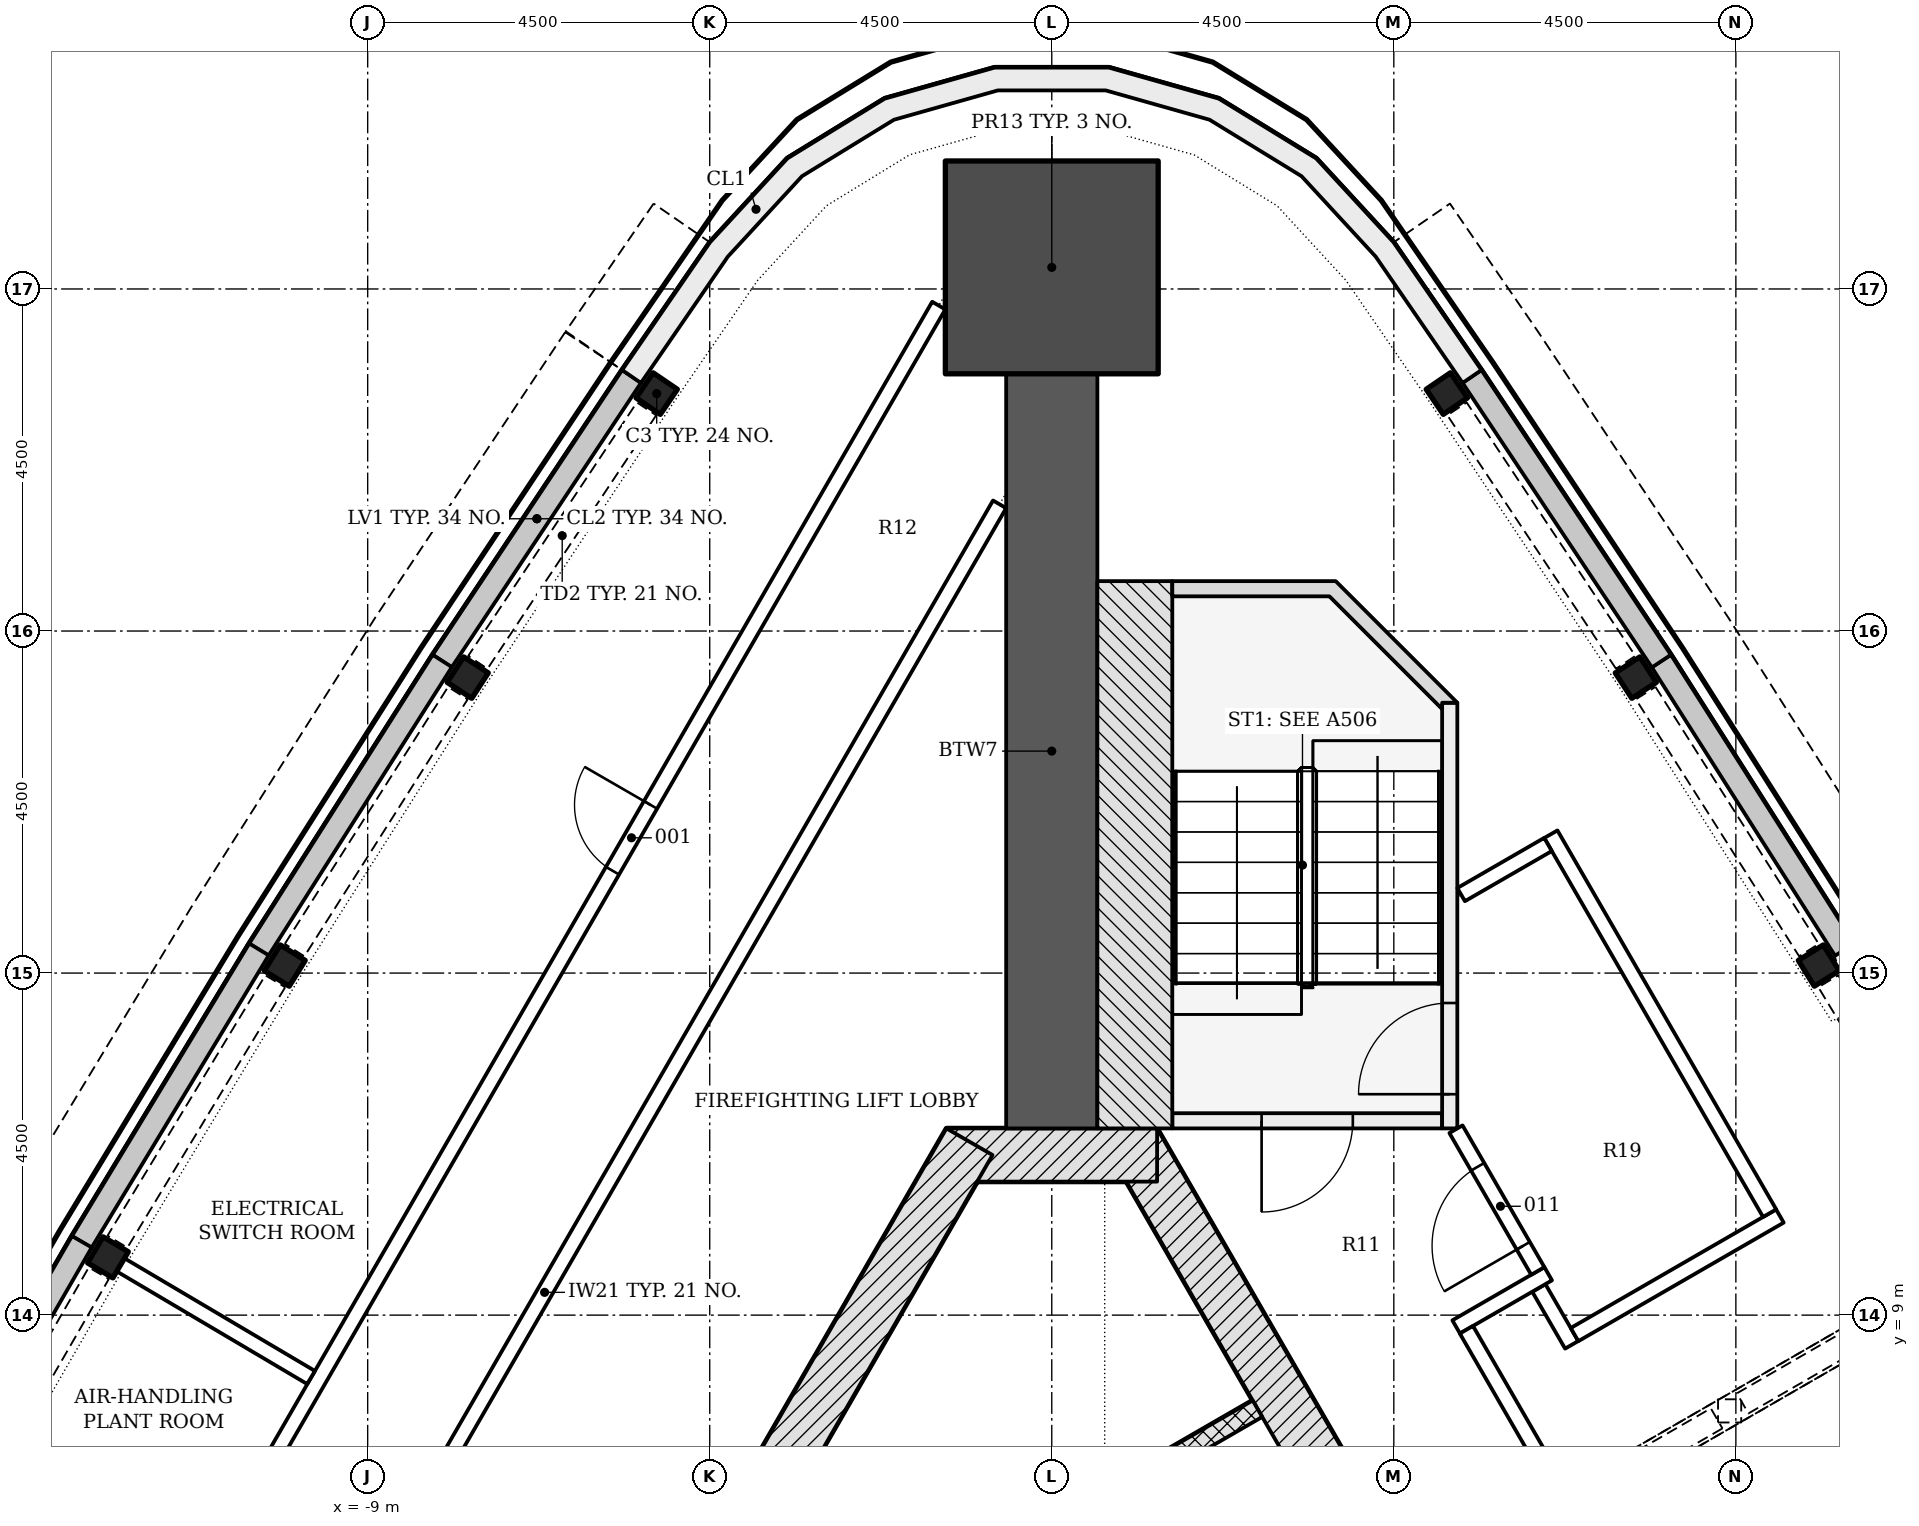
"""IFC4 building model, lengths in metres.
Left out: names, types, materials, properties, quantities, classifications, styles, units other than length and angle.
Written with IfcOpenShell. Run it as: python <this file> out.ifc"""

import sys

from ifc_helpers import new_model, si_unit, direction, frame, frame_2d, origin, origin_2d, place, context, subcontext, project, spatial, polyline, rectangle, i_section, outline, extrude, element, fill, save


model = new_model("IFC4")
c1 = context("Model", 3, precision=1e-05, world=origin(), true_north=direction((0.0, 1.0)))
c2 = subcontext(c1, "Body", "Model", "MODEL_VIEW")
j1 = project(units=[si_unit("LENGTHUNIT", "METRE"), si_unit("PLANEANGLEUNIT", "RADIAN")], contexts=[c1])
p1 = place(None, origin())
s1 = spatial("IfcSite", under=j1, at=p1, CompositionType="ELEMENT")
p2 = place(p1, origin())
s2 = spatial("IfcBuilding", under=s1, at=p2, CompositionType="ELEMENT")
p3 = place(p2, frame((0.0, 0.0, 168.9)))
s3 = spatial("IfcBuildingStorey", under=s2, at=p3, CompositionType="ELEMENT", Elevation=168.9)
p4 = place(p3, frame((10.311, -4.703, -0.3), z_axis=(0.0, 0.0, 1.0), x_axis=(-0.500001446645, 0.866024568562, 0.0)))
e1 = element("IfcWall", 1, at=p4, inside=s3, PredefinedType="SHEAR", context=c2, shape_type="SweptSolid", body=[
    extrude(rectangle(XDim=18.458, YDim=0.7, at=frame_2d((9.229, 0.0))), origin(), (0.0, 0.0, 1.0), 5.5),
])
p5 = place(p3, frame((1.386, 11.106, -0.3), z_axis=(0.0, 0.0, 1.0), x_axis=(-1.0, 0.0, 0.0)))
e2 = element("IfcWall", 2, at=p5, inside=s3, PredefinedType="SHEAR", context=c2, shape_type="SweptSolid", body=[
    extrude(rectangle(XDim=2.771, YDim=0.7, at=frame_2d((1.386, 0.0))), origin(), (0.0, 0.0, 1.0), 5.5),
])
p6 = place(p3, frame((-1.083, 11.281, -0.3), z_axis=(0.0, 0.0, 1.0), x_axis=(-0.500001446645, -0.866024568562, 0.0)))
e3 = element("IfcWall", 3, at=p6, inside=s3, PredefinedType="SHEAR", context=c2, shape_type="SweptSolid", body=[
    extrude(rectangle(XDim=18.458, YDim=0.7, at=frame_2d((9.229, 0.0))), origin(), (0.0, 0.0, 1.0), 5.5),
])
p7 = place(p6, frame((8.979, 0.0, 0.3)))
e4 = element("IfcOpeningElement", 4, at=p7, cuts=e3, PredefinedType="OPENING", context=c2, shape_type="SweptSolid", body=[
    extrude(rectangle(XDim=1.2, YDim=2.1, at=frame_2d((0.6, 1.05))), frame((0.0, 0.36, 0.0), z_axis=(0.0, -1.0, 0.0), x_axis=(1.0, 0.0, 0.0)), (0.0, 0.0, 1.0), 0.72),
])
p8 = place(p6, frame((11.029, 0.0, 0.3)))
e5 = element("IfcOpeningElement", 5, at=p8, cuts=e3, PredefinedType="OPENING", context=c2, shape_type="SweptSolid", body=[
    extrude(rectangle(XDim=1.2, YDim=2.1, at=frame_2d((0.6, 1.05))), frame((0.0, 0.36, 0.0), z_axis=(0.0, -1.0, 0.0), x_axis=(1.0, 0.0, 0.0)), (0.0, 0.0, 1.0), 0.72),
])
p9 = place(p3, frame((0.0, 11.456, -0.3), z_axis=(0.0, 0.0, 1.0), x_axis=(0.0, 1.0, 0.0)))
e6 = element("IfcWall", 6, at=p9, inside=s3, PredefinedType="SHEAR", context=c2, shape_type="SweptSolid", body=[
    extrude(rectangle(XDim=9.928, YDim=1.2, at=frame_2d((4.964, 0.0))), origin(), (0.0, 0.0, 1.0), 5.5),
])
p10 = place(p3, frame((0.0, 22.784, -0.3), z_axis=(0.0, 0.0, 1.0), x_axis=(0.0, 1.0, 0.0)))
e7 = element("IfcColumn", 7, at=p10, inside=s3, PredefinedType="COLUMN", context=c2, shape_type="SweptSolid", body=[
    extrude(rectangle(XDim=2.8, YDim=2.8, at=origin_2d()), origin(), (0.0, 0.0, 1.0), 5.5),
])
for number, where, z_axis, x_axis in (
    (8, (-5.198, 21.124, -0.3), (0.0, 0.0, 1.0), (-0.563, -0.827, 0.0)),
    (9, (-7.684, 17.387, -0.3), (0.0, 0.0, 1.0), (-0.545, -0.838, 0.0)),
    (10, (-10.091, 13.599, -0.3), (0.0, 0.0, 1.0), (-0.527, -0.85, 0.0)),
    (11, (-12.417, 9.76, -0.3), (0.0, 0.0, 1.0), (-0.509, -0.861, 0.0)),
    (12, (10.091, 13.599, -0.3), (0.0, 0.0, 1.0), (-0.527, 0.85, 0.0)),
    (13, (7.684, 17.387, -0.3), (0.0, 0.0, 1.0), (-0.545, 0.838, 0.0)),
    (14, (5.198, 21.124, -0.3), (0.0, 0.0, 1.0), (-0.563, 0.827, 0.0)),
):
    element("IfcColumn", number, at=place(p3, frame(where, z_axis=z_axis, x_axis=x_axis)), inside=s3, PredefinedType="COLUMN", context=c2, shape_type="SweptSolid", body=[
        extrude(i_section(OverallWidth=0.399, OverallDepth=0.386, WebThickness=0.021, FlangeThickness=0.033, FilletRadius=0.015, at=origin_2d()), origin(), (0.0, 0.0, 1.0), 5.5),
    ])
p11 = place(p3, origin())
e15 = element("IfcWall", 15, at=p11, inside=s3, PredefinedType="NOTDEFINED", context=c2, shape_type="SweptSolid", body=[
    extrude(outline(polyline([(-5.652, 21.433), (-8.145, 17.687), (-7.896, 17.521), (-5.403, 21.267), (-5.652, 21.433)])), origin(), (0.0, 0.0, 1.0), 1.2),
])
p12 = place(p3, origin())
e16 = element("IfcWall", 16, at=p12, inside=s3, PredefinedType="NOTDEFINED", context=c2, shape_type="SweptSolid", body=[
    extrude(outline(polyline([(-8.145, 17.687), (-10.558, 13.889), (-10.305, 13.728), (-7.892, 17.526), (-8.145, 17.687)])), origin(), (0.0, 0.0, 1.0), 1.2),
])
p13 = place(p3, origin())
e17 = element("IfcWall", 17, at=p13, inside=s3, PredefinedType="NOTDEFINED", context=c2, shape_type="SweptSolid", body=[
    extrude(outline(polyline([(-10.558, 13.889), (-12.89, 10.04), (-12.634, 9.885), (-10.302, 13.733), (-10.558, 13.889)])), origin(), (0.0, 0.0, 1.0), 1.2),
])
p14 = place(p3, origin())
e18 = element("IfcWall", 18, at=p14, inside=s3, PredefinedType="NOTDEFINED", context=c2, shape_type="SweptSolid", body=[
    extrude(outline(polyline([(-12.89, 10.04), (-15.14, 6.143), (-14.88, 5.993), (-12.63, 9.89), (-12.89, 10.04)])), origin(), (0.0, 0.0, 1.0), 1.2),
])
p15 = place(p3, origin())
e19 = element("IfcWall", 19, at=p15, inside=s3, PredefinedType="NOTDEFINED", context=c2, shape_type="SweptSolid", body=[
    extrude(outline(polyline([(10.558, 13.889), (8.145, 17.687), (7.892, 17.526), (10.305, 13.728), (10.558, 13.889)])), origin(), (0.0, 0.0, 1.0), 1.2),
])
p16 = place(p3, origin())
e20 = element("IfcWall", 20, at=p16, inside=s3, PredefinedType="NOTDEFINED", context=c2, shape_type="SweptSolid", body=[
    extrude(outline(polyline([(8.145, 17.687), (5.652, 21.433), (5.403, 21.267), (7.896, 17.521), (8.145, 17.687)])), origin(), (0.0, 0.0, 1.0), 1.2),
])
p17 = place(p3, origin())
e21 = element("IfcWall", 21, at=p17, inside=s3, PredefinedType="NOTDEFINED", context=c2, shape_type="SweptSolid", body=[
    extrude(outline(polyline([(5.652, 21.433), (4.497, 23.113), (3.478, 24.218), (2.198, 25.004), (0.751, 25.412), (-0.751, 25.412), (-2.198, 25.004), (-3.478, 24.218), (-4.497, 23.113), (-5.652, 21.433), (-5.405, 21.263), (-4.262, 22.926), (-3.286, 23.984), (-2.076, 24.727), (-0.71, 25.112), (0.71, 25.112), (2.076, 24.727), (3.286, 23.984), (4.262, 22.926), (5.405, 21.263), (5.652, 21.433)])), origin(), (0.0, 0.0, 1.0), 5.2),
])
p18 = place(p3, frame((2.706, 7.769, -0.3), z_axis=(0.0, 0.0, 1.0), x_axis=(-0.866022959057, -0.500004234368, 0.0)))
e22 = element("IfcWall", 22, at=p18, inside=s3, PredefinedType="PARTITIONING", context=c2, shape_type="SweptSolid", body=[
    extrude(rectangle(XDim=2.5, YDim=0.25, at=frame_2d((1.25, 0.0))), origin(), (0.0, 0.0, 1.0), 5.5),
])
p19 = place(p3, frame((5.135, 11.556, -0.3), z_axis=(0.0, 0.0, 1.0), x_axis=(-1.0, 0.0, 0.0)))
e23 = element("IfcWall", 23, at=p19, inside=s3, PredefinedType="SHEAR", context=c2, shape_type="SweptSolid", body=[
    extrude(rectangle(XDim=3.55, YDim=0.2, at=frame_2d((1.775, 0.0))), origin(), (0.0, 0.0, 1.0), 5.5),
])
p20 = place(p19, frame((1.175, 0.0, 0.3)))
e24 = element("IfcOpeningElement", 24, at=p20, cuts=e23, PredefinedType="OPENING", context=c2, shape_type="SweptSolid", body=[
    extrude(rectangle(XDim=1.2, YDim=2.1, at=frame_2d((0.6, 1.05))), frame((0.0, 0.11, 0.0), z_axis=(0.0, -1.0, 0.0), x_axis=(1.0, 0.0, 0.0)), (0.0, 0.0, 1.0), 0.22),
])
p21 = place(p3, frame((5.236, 11.456, -0.3), z_axis=(0.0, 0.0, 1.0), x_axis=(0.0, 1.0, 0.0)))
e25 = element("IfcWall", 25, at=p21, inside=s3, PredefinedType="SHEAR", context=c2, shape_type="SweptSolid", body=[
    extrude(rectangle(XDim=5.6, YDim=0.2, at=frame_2d((2.8, 0.0))), origin(), (0.0, 0.0, 1.0), 5.5),
])
p22 = place(p21, frame((0.45, 0.0, 0.3)))
e26 = element("IfcOpeningElement", 26, at=p22, cuts=e25, PredefinedType="OPENING", context=c2, shape_type="SweptSolid", body=[
    extrude(rectangle(XDim=1.2, YDim=2.1, at=frame_2d((0.6, 1.05))), frame((0.0, 0.11, 0.0), z_axis=(0.0, -1.0, 0.0), x_axis=(1.0, 0.0, 0.0)), (0.0, 0.0, 1.0), 0.22),
])
p23 = place(p3, frame((1.093, 11.456, -0.3), z_axis=(0.0, 0.0, 1.0), x_axis=(0.0, 1.0, 0.0)))
e27 = element("IfcWall", 27, at=p23, inside=s3, PredefinedType="SHEAR", context=c2, shape_type="SweptSolid", body=[
    extrude(rectangle(XDim=7.2, YDim=0.986, at=frame_2d((3.6, 0.0))), origin(), (0.0, 0.0, 1.0), 5.5),
])
p24 = place(p3, frame((0.0, 0.0, -0.3)))
e28 = element("IfcWall", 28, at=p24, inside=s3, PredefinedType="SHEAR", context=c2, shape_type="SweptSolid", body=[
    extrude(outline(polyline([(5.336, 17.056), (3.736, 18.656), (1.586, 18.656), (1.586, 18.456), (3.653, 18.456), (5.135, 16.974), (5.135, 17.056), (5.135, 17.056), (5.135, 17.056), (5.135, 17.056), (5.135, 17.056), (5.135, 17.056), (5.135, 17.056), (5.135, 17.056), (5.135, 17.056), (5.135, 17.056), (5.135, 17.056), (5.135, 17.056), (5.135, 17.056), (5.135, 17.056), (5.135, 17.056), (5.135, 17.056), (5.135, 17.056), (5.336, 17.056)])), origin(), (0.0, 0.0, 1.0), 5.5),
])
p25 = place(p3, frame((-0.687, 19.667, 0.0), z_axis=(0.0, 0.0, 1.0), x_axis=(-0.500000491645, -0.866025119933, 0.0)))
e29 = element("IfcWall", 29, at=p25, inside=s3, PredefinedType="PARTITIONING", context=c2, shape_type="SweptSolid", body=[
    extrude(rectangle(XDim=23.943, YDim=0.2, at=frame_2d((11.971, 0.0))), origin(), (0.0, 0.0, 1.0), 4.647),
])
p26 = place(p25, frame((16.287, 0.0, 0.0)))
e30 = element("IfcOpeningElement", 30, at=p26, cuts=e29, PredefinedType="OPENING", context=c2, shape_type="SweptSolid", body=[
    extrude(rectangle(XDim=1.2, YDim=2.1, at=frame_2d((0.6, 1.05))), frame((0.0, 0.11, 0.0), z_axis=(0.0, -1.0, 0.0), x_axis=(1.0, 0.0, 0.0)), (0.0, 0.0, 1.0), 0.22),
])
p27 = place(p3, frame((-16.104, -3.037, 0.0), z_axis=(0.0, 0.0, 1.0), x_axis=(0.500000282061, 0.866025240936, 0.0)))
e31 = element("IfcWall", 31, at=p27, inside=s3, PredefinedType="PARTITIONING", context=c2, shape_type="SweptSolid", body=[
    extrude(rectangle(XDim=29.235, YDim=0.2, at=frame_2d((14.617, 0.0))), origin(), (0.0, 0.0, 1.0), 4.647),
])
p28 = place(p27, frame((20.65, 0.0, 0.0)))
e32 = element("IfcOpeningElement", 32, at=p28, cuts=e31, PredefinedType="OPENING", context=c2, shape_type="SweptSolid", body=[
    extrude(rectangle(XDim=1.0, YDim=2.1, at=frame_2d((0.5, 1.05))), frame((0.0, 0.11, 0.0), z_axis=(0.0, -1.0, 0.0), x_axis=(1.0, 0.0, 0.0)), (0.0, 0.0, 1.0), 0.22),
])
p29 = place(p27, frame((10.287, 0.0, 0.0)))
e33 = element("IfcOpeningElement", 33, at=p29, cuts=e31, PredefinedType="OPENING", context=c2, shape_type="SweptSolid", body=[
    extrude(rectangle(XDim=1.0, YDim=2.1, at=frame_2d((0.5, 1.05))), frame((0.0, 0.11, 0.0), z_axis=(0.0, -1.0, 0.0), x_axis=(1.0, 0.0, 0.0)), (0.0, 0.0, 1.0), 0.22),
])
p30 = place(p27, frame((5.865, 0.0, 0.0)))
e34 = element("IfcOpeningElement", 34, at=p30, cuts=e31, PredefinedType="OPENING", context=c2, shape_type="SweptSolid", body=[
    extrude(rectangle(XDim=1.0, YDim=2.1, at=frame_2d((0.5, 1.05))), frame((0.0, 0.11, 0.0), z_axis=(0.0, -1.0, 0.0), x_axis=(1.0, 0.0, 0.0)), (0.0, 0.0, 1.0), 0.22),
])
p31 = place(p27, frame((1.859, 0.0, 0.0)))
e35 = element("IfcOpeningElement", 35, at=p31, cuts=e31, PredefinedType="OPENING", context=c2, shape_type="SweptSolid", body=[
    extrude(rectangle(XDim=1.0, YDim=2.1, at=frame_2d((0.5, 1.05))), frame((0.0, 0.11, 0.0), z_axis=(0.0, -1.0, 0.0), x_axis=(1.0, 0.0, 0.0)), (0.0, 0.0, 1.0), 0.22),
])
p32 = place(p3, frame((-12.288, 9.684, 0.0), z_axis=(0.0, 0.0, 1.0), x_axis=(0.860699381133, -0.509113519088, 0.0)))
e36 = element("IfcWall", 36, at=p32, inside=s3, PredefinedType="PARTITIONING", context=c2, shape_type="SweptSolid", body=[
    extrude(rectangle(XDim=2.954, YDim=0.2, at=frame_2d((1.477, 0.0))), origin(), (0.0, 0.0, 1.0), 4.647),
])
p33 = place(p3, frame((6.408, 9.358, 0.0), z_axis=(0.0, 0.0, 1.0), x_axis=(0.49996696679, -0.866044474677, 0.0)))
e37 = element("IfcWall", 37, at=p33, inside=s3, PredefinedType="PARTITIONING", context=c2, shape_type="SweptSolid", body=[
    extrude(rectangle(XDim=0.864, YDim=0.2, at=frame_2d((0.432, 0.0))), origin(), (0.0, 0.0, 1.0), 5.2),
])
p34 = place(p3, frame((5.32, 8.845, 0.0), z_axis=(0.0, 0.0, 1.0), x_axis=(0.866031452229, 0.49998952364, 0.0)))
e38 = element("IfcWall", 38, at=p34, inside=s3, PredefinedType="PARTITIONING", context=c2, shape_type="SweptSolid", body=[
    extrude(rectangle(XDim=1.398, YDim=0.2, at=frame_2d((0.699, 0.0))), origin(), (0.0, 0.0, 1.0), 5.2),
])
p35 = place(p3, frame((6.395, 9.581, 0.0), z_axis=(0.0, 0.0, 1.0), x_axis=(-0.500003735859, 0.866023246874, 0.0)))
e39 = element("IfcWall", 39, at=p35, inside=s3, PredefinedType="PARTITIONING", context=c2, shape_type="SweptSolid", body=[
    extrude(rectangle(XDim=2.154, YDim=0.2, at=frame_2d((1.077, 0.0))), origin(), (0.0, 0.0, 1.0), 4.647),
])
p36 = place(p35, frame((0.383, 0.0, 0.0)))
e40 = element("IfcOpeningElement", 40, at=p36, cuts=e39, PredefinedType="OPENING", context=c2, shape_type="SweptSolid", body=[
    extrude(rectangle(XDim=1.2, YDim=2.1, at=frame_2d((0.6, 1.05))), frame((0.0, 0.11, 0.0), z_axis=(0.0, -1.0, 0.0), x_axis=(1.0, 0.0, 0.0)), (0.0, 0.0, 1.0), 0.22),
])
p37 = place(p3, frame((5.455, 8.808, 0.0), z_axis=(0.0, 0.0, 1.0), x_axis=(0.49999276215, -0.866029582519, 0.0)))
e41 = element("IfcWall", 41, at=p37, inside=s3, PredefinedType="PARTITIONING", context=c2, shape_type="SweptSolid", body=[
    extrude(rectangle(XDim=19.337, YDim=0.2, at=frame_2d((9.668, 0.0))), origin(), (0.0, 0.0, 1.0), 5.2),
])
p38 = place(p37, frame((8.556, 0.0, 0.0)))
e42 = element("IfcOpeningElement", 42, at=p38, cuts=e41, PredefinedType="OPENING", context=c2, shape_type="SweptSolid", body=[
    extrude(rectangle(XDim=1.0, YDim=2.1, at=frame_2d((0.5, 1.05))), frame((0.0, 0.11, 0.0), z_axis=(0.0, -1.0, 0.0), x_axis=(1.0, 0.0, 0.0)), (0.0, 0.0, 1.0), 0.22),
])
p39 = place(p3, frame((6.878, 8.744, 0.0), z_axis=(0.0, 0.0, 1.0), x_axis=(0.866023983177, 0.500002460556, 0.0)))
e43 = element("IfcWall", 43, at=p39, inside=s3, PredefinedType="PARTITIONING", context=c2, shape_type="SweptSolid", body=[
    extrude(rectangle(XDim=3.12, YDim=0.2, at=frame_2d((1.56, 0.0))), origin(), (0.0, 0.0, 1.0), 5.2),
])
p40 = place(p3, frame((6.566, 15.327, 0.0), z_axis=(0.0, 0.0, 1.0), x_axis=(0.499997778408, -0.866026686418, 0.0)))
e44 = element("IfcWall", 44, at=p40, inside=s3, PredefinedType="PARTITIONING", context=c2, shape_type="SweptSolid", body=[
    extrude(rectangle(XDim=5.757, YDim=0.2, at=frame_2d((2.878, 0.0))), origin(), (0.0, 0.0, 1.0), 4.647),
])
p41 = place(p3, frame((6.529, 15.192, 0.0), z_axis=(0.0, 0.0, 1.0), x_axis=(-0.866117824122, -0.499839889103, 0.0)))
e45 = element("IfcWall", 45, at=p41, inside=s3, PredefinedType="PARTITIONING", context=c2, shape_type="SweptSolid", body=[
    extrude(rectangle(XDim=1.32, YDim=0.2, at=frame_2d((0.66, 0.0))), origin(), (0.0, 0.0, 1.0), 5.2),
])
p42 = place(p20, origin())
e46 = element("IfcDoor", 46, at=p42, inside=s3, OperationType="SINGLE_SWING_RIGHT", PredefinedType="DOOR", context=c2, shape_type="SweptSolid", body=[
    extrude(rectangle(XDim=1.2, YDim=2.1, at=frame_2d((0.6, 1.05))), frame((0.0, 0.025, 0.0), z_axis=(0.0, -1.0, 0.0), x_axis=(1.0, 0.0, 0.0)), (0.0, 0.0, 1.0), 0.05),
])
fill(e24, e46)
p43 = place(p22, origin())
e47 = element("IfcDoor", 47, at=p43, inside=s3, OperationType="SINGLE_SWING_LEFT", PredefinedType="DOOR", context=c2, shape_type="SweptSolid", body=[
    extrude(rectangle(XDim=1.2, YDim=2.1, at=frame_2d((0.6, 1.05))), frame((0.0, 0.025, 0.0), z_axis=(0.0, -1.0, 0.0), x_axis=(1.0, 0.0, 0.0)), (0.0, 0.0, 1.0), 0.05),
])
fill(e26, e47)
p44 = place(p28, origin())
e48 = element("IfcDoor", 48, at=p44, inside=s3, OperationType="SINGLE_SWING_RIGHT", PredefinedType="DOOR", context=c2, shape_type="SweptSolid", body=[
    extrude(rectangle(XDim=1.0, YDim=2.1, at=frame_2d((0.5, 1.05))), frame((0.0, 0.025, 0.0), z_axis=(0.0, -1.0, 0.0), x_axis=(1.0, 0.0, 0.0)), (0.0, 0.0, 1.0), 0.05),
])
fill(e32, e48)
p45 = place(p36, origin())
e49 = element("IfcDoor", 49, at=p45, inside=s3, OperationType="SINGLE_SWING_LEFT", PredefinedType="DOOR", context=c2, shape_type="SweptSolid", body=[
    extrude(rectangle(XDim=1.2, YDim=2.1, at=frame_2d((0.6, 1.05))), frame((0.0, 0.025, 0.0), z_axis=(0.0, -1.0, 0.0), x_axis=(1.0, 0.0, 0.0)), (0.0, 0.0, 1.0), 0.05),
])
fill(e40, e49)
save(model, sys.argv[1])
